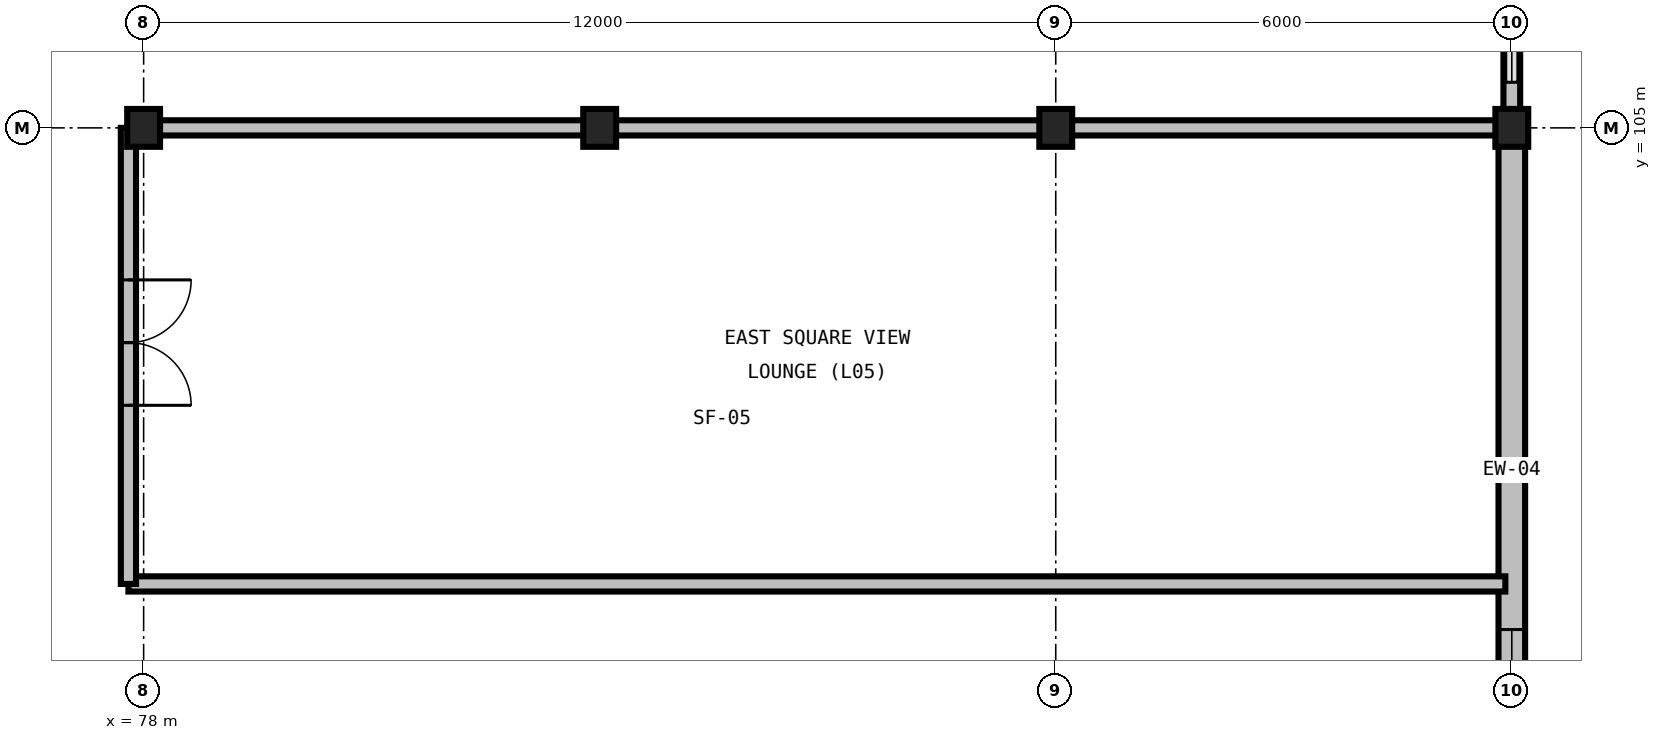
"""IFC4 building model, lengths in metres.
Left out: names, types, materials, properties, quantities, classifications, styles, units other than length and angle.
Written with IfcOpenShell. Run it as: python <this file> out.ifc"""

import sys

from ifc_helpers import new_model, si_unit, direction, frame, frame_2d, origin, origin_2d, place, context, subcontext, project, spatial, rectangle, i_section, extrude, element, fill, save


model = new_model("IFC4")
c1 = context("Model", 3, precision=1e-05, world=origin(), true_north=direction((0.0, 1.0)))
c2 = subcontext(c1, "Body", "Model", "MODEL_VIEW")
j1 = project(units=[si_unit("LENGTHUNIT", "METRE"), si_unit("PLANEANGLEUNIT", "RADIAN")], contexts=[c1])
p1 = place(None, origin())
s1 = spatial("IfcSite", under=j1, at=p1, CompositionType="ELEMENT")
p2 = place(p1, origin())
s2 = spatial("IfcBuilding", under=s1, at=p2, CompositionType="ELEMENT")
p3 = place(p2, frame((0.0, 0.0, 27.6)))
s3 = spatial("IfcBuildingStorey", under=s2, at=p3, CompositionType="ELEMENT", Elevation=27.6)
for number, where, z_axis, x_axis in (
    (1, (78.0, 105.0, 0.0), (0.0, 0.0, 1.0), (1.0, 0.0, 0.0)),
    (2, (84.0, 105.0, 0.0), (0.0, 0.0, 1.0), (1.0, 0.0, 0.0)),
    (3, (90.0, 105.0, 0.0), (0.0, 0.0, 1.0), (1.0, 0.0, 0.0)),
    (4, (96.0, 105.0, 0.0), (0.0, 0.0, 1.0), (1.0, 0.0, 0.0)),
):
    element("IfcColumn", number, at=place(p3, frame(where, z_axis=z_axis, x_axis=x_axis)), inside=s3, PredefinedType="COLUMN", context=c2, shape_type="SweptSolid", body=[
        extrude(i_section(OverallWidth=0.432, OverallDepth=0.498, WebThickness=0.056, FlangeThickness=0.089, FilletRadius=0.031, at=origin_2d()), origin(), (0.0, 0.0, 1.0), 3.6),
    ])
p4 = place(p3, frame((96.0, 96.0, 0.0), z_axis=(0.0, 0.0, 1.0), x_axis=(0.0, 1.0, 0.0)))
e5 = element("IfcWall", 5, at=p4, inside=s3, PredefinedType="STANDARD", context=c2, shape_type="SweptSolid", body=[
    extrude(rectangle(XDim=9.0, YDim=0.35, at=frame_2d((4.5, 0.0))), origin(), (0.0, 0.0, 1.0), 2.981),
])
p5 = place(p4, frame((0.6, 0.0, 0.85)))
e6 = element("IfcOpeningElement", 6, at=p5, cuts=e5, PredefinedType="OPENING", context=c2, shape_type="SweptSolid", body=[
    extrude(rectangle(XDim=1.8, YDim=1.5, at=frame_2d((0.9, 0.75))), frame((0.0, 0.19, 0.0), z_axis=(0.0, -1.0, 0.0), x_axis=(1.0, 0.0, 0.0)), (0.0, 0.0, 1.0), 0.38),
])
p6 = place(p3, frame((96.0, 105.0, 0.0), z_axis=(0.0, 0.0, 1.0), x_axis=(0.0, 1.0, 0.0)))
e7 = element("IfcWall", 7, at=p6, inside=s3, PredefinedType="PARAPET", context=c2, shape_type="SweptSolid", body=[
    extrude(rectangle(XDim=12.0, YDim=0.22, at=frame_2d((6.0, 0.0))), origin(), (0.0, 0.0, 1.0), 0.2),
])
p7 = place(p3, frame((77.8, 99.0, 0.0), z_axis=(0.0, 0.0, 1.0), x_axis=(1.0, 0.0, 0.0)))
e8 = element("IfcWall", 8, at=p7, inside=s3, PredefinedType="PARTITIONING", context=c2, shape_type="SweptSolid", body=[
    extrude(rectangle(XDim=18.115, YDim=0.2, at=frame_2d((9.057, 0.0))), origin(), (0.0, 0.0, 1.0), 3.29),
])
p8 = place(p3, frame((95.915, 105.0, 0.0), z_axis=(0.0, 0.0, 1.0), x_axis=(-1.0, 0.0, 0.0)))
e9 = element("IfcWall", 9, at=p8, inside=s3, PredefinedType="PARTITIONING", context=c2, shape_type="SweptSolid", body=[
    extrude(rectangle(XDim=18.115, YDim=0.2, at=frame_2d((9.057, 0.0))), origin(), (0.0, 0.0, 1.0), 2.736),
])
p9 = place(p3, frame((77.8, 105.0, 0.0), z_axis=(0.0, 0.0, 1.0), x_axis=(0.0, -1.0, 0.0)))
e10 = element("IfcWall", 10, at=p9, inside=s3, PredefinedType="PARTITIONING", context=c2, shape_type="SweptSolid", body=[
    extrude(rectangle(XDim=6.0, YDim=0.2, at=frame_2d((3.0, 0.0))), origin(), (0.0, 0.0, 1.0), 3.29),
])
p10 = place(p9, frame((2.0, 0.0, 0.0)))
e11 = element("IfcOpeningElement", 11, at=p10, cuts=e10, PredefinedType="OPENING", context=c2, shape_type="SweptSolid", body=[
    extrude(rectangle(XDim=1.65, YDim=2.25, at=frame_2d((0.825, 1.125))), frame((0.0, 0.115, 0.0), z_axis=(0.0, -1.0, 0.0), x_axis=(1.0, 0.0, 0.0)), (0.0, 0.0, 1.0), 0.23),
])
p11 = place(p5, origin())
e12 = element("IfcWindow", 12, at=p11, inside=s3, PartitioningType="SINGLE_PANEL", PredefinedType="WINDOW", context=c2, shape_type="SweptSolid", body=[
    extrude(rectangle(XDim=1.8, YDim=1.5, at=frame_2d((0.9, 0.75))), frame((0.0, 0.03, 0.0), z_axis=(0.0, -1.0, 0.0), x_axis=(1.0, 0.0, 0.0)), (0.0, 0.0, 1.0), 0.06),
])
fill(e6, e12)
p12 = place(p10, origin())
e13 = element("IfcDoor", 13, at=p12, inside=s3, OperationType="DOUBLE_DOOR_SINGLE_SWING", PredefinedType="DOOR", context=c2, shape_type="SweptSolid", body=[
    extrude(rectangle(XDim=1.65, YDim=2.25, at=frame_2d((0.825, 1.125))), frame((0.0, 0.025, 0.0), z_axis=(0.0, -1.0, 0.0), x_axis=(1.0, 0.0, 0.0)), (0.0, 0.0, 1.0), 0.05),
])
fill(e11, e13)
save(model, sys.argv[1])
